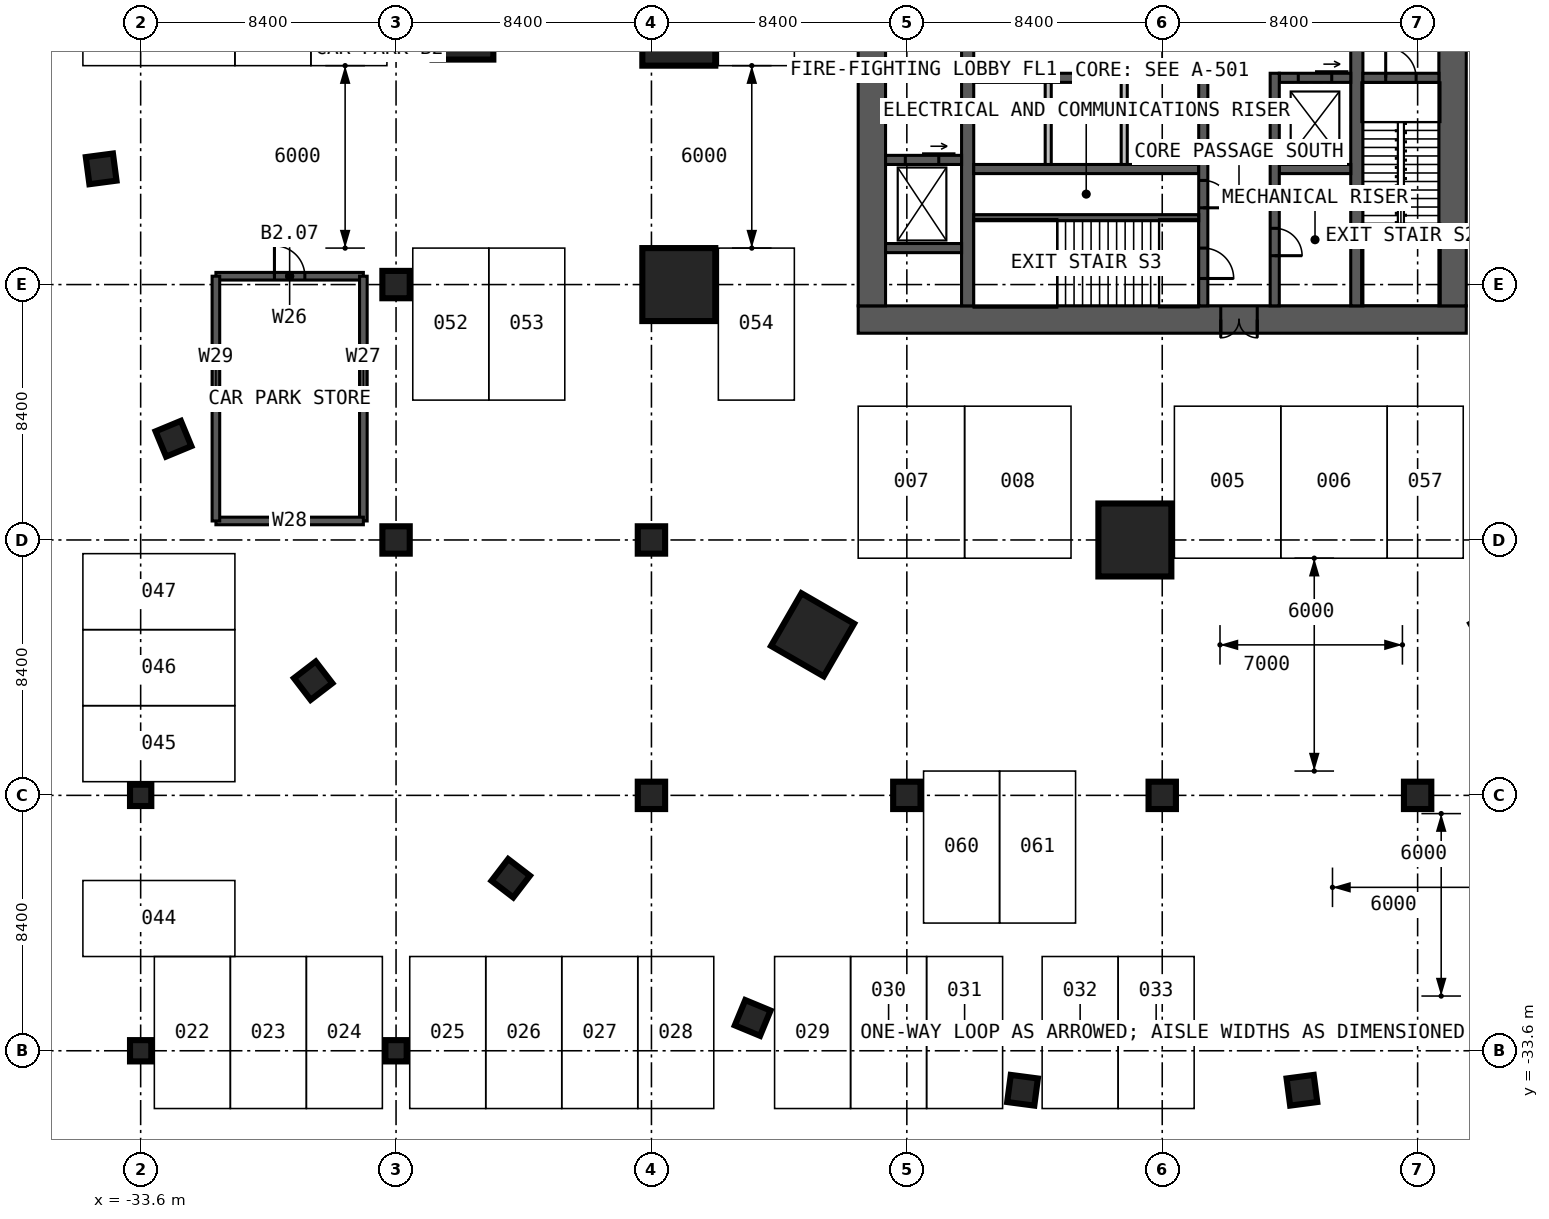
"""IFC4 building model, lengths in metres.
Left out: names, types, materials, properties, quantities, classifications, styles, units other than length and angle.
Written with IfcOpenShell. Run it as: python <this file> out.ifc"""

import sys

from ifc_helpers import new_model, si_unit, direction, frame, frame_2d, origin, origin_2d, place, context, subcontext, project, spatial, rectangle, hollow_rectangle, extrude, element, fill, save


model = new_model("IFC4")
c1 = context("Model", 3, precision=1e-05, world=origin(), true_north=direction((0.0, 1.0)))
c2 = subcontext(c1, "Body", "Model", "MODEL_VIEW")
j1 = project(units=[si_unit("LENGTHUNIT", "METRE"), si_unit("PLANEANGLEUNIT", "RADIAN")], contexts=[c1])
p1 = place(None, origin())
s1 = spatial("IfcSite", under=j1, at=p1, CompositionType="ELEMENT")
p2 = place(p1, origin())
s2 = spatial("IfcBuilding", under=s1, at=p2, CompositionType="ELEMENT")
p3 = place(p2, frame((0.0, 0.0, -9.0)))
s3 = spatial("IfcBuildingStorey", under=s2, at=p3, CompositionType="ELEMENT", Elevation=-9.0)
for number, where, z_axis, x_axis in (
    (1, (-25.2, -16.8, 0.0), (0.0, 0.0, 1.0), (1.0, 0.0, 0.0)),
    (2, (-25.2, -8.4, 0.0), (0.0, 0.0, 1.0), (1.0, 0.0, 0.0)),
    (3, (-16.8, -25.2, 0.0), (0.0, 0.0, 1.0), (1.0, 0.0, 0.0)),
    (4, (-16.8, -16.8, 0.0), (0.0, 0.0, 1.0), (1.0, 0.0, 0.0)),
):
    element("IfcColumn", number, at=place(p3, frame(where, z_axis=z_axis, x_axis=x_axis)), inside=s3, PredefinedType="COLUMN", context=c2, shape_type="SweptSolid", body=[
        extrude(rectangle(XDim=0.9, YDim=0.9, at=origin_2d()), origin(), (0.0, 0.0, 1.0), 4.5),
    ])
for number, where, z_axis, x_axis in (
    (5, (-15.9, -8.4, 0.0), (0.0, 0.0, 1.0), (1.0, 0.0, 0.0)),
    (6, (-15.9, 0.0, 0.0), (0.0, 0.0, 1.0), (1.0, 0.0, 0.0)),
):
    element("IfcColumn", number, at=place(p3, frame(where, z_axis=z_axis, x_axis=x_axis)), inside=s3, PredefinedType="COLUMN", context=c2, shape_type="SweptSolid", body=[
        extrude(rectangle(XDim=2.4, YDim=2.4, at=origin_2d()), origin(), (0.0, 0.0, 1.0), 4.5),
    ])
for number, where, z_axis, x_axis in (
    (7, (-8.4, -25.2, 0.0), (0.0, 0.0, 1.0), (1.0, 0.0, 0.0)),
    (8, (0.0, -25.2, 0.0), (0.0, 0.0, 1.0), (1.0, 0.0, 0.0)),
):
    element("IfcColumn", number, at=place(p3, frame(where, z_axis=z_axis, x_axis=x_axis)), inside=s3, PredefinedType="COLUMN", context=c2, shape_type="SweptSolid", body=[
        extrude(rectangle(XDim=0.9, YDim=0.9, at=origin_2d()), origin(), (0.0, 0.0, 1.0), 4.5),
    ])
p4 = place(p3, frame((-0.9, -16.8, 0.0), z_axis=(0.0, 0.0, 1.0), x_axis=(1.0, 0.0, 0.0)))
e9 = element("IfcColumn", 9, at=p4, inside=s3, PredefinedType="COLUMN", context=c2, shape_type="SweptSolid", body=[
    extrude(rectangle(XDim=2.4, YDim=2.4, at=origin_2d()), origin(), (0.0, 0.0, 1.0), 4.5),
])
p5 = place(p3, frame((8.4, -25.2, 0.0), z_axis=(0.0, 0.0, 1.0), x_axis=(1.0, 0.0, 0.0)))
e10 = element("IfcColumn", 10, at=p5, inside=s3, PredefinedType="COLUMN", context=c2, shape_type="SweptSolid", body=[
    extrude(rectangle(XDim=0.9, YDim=0.9, at=origin_2d()), origin(), (0.0, 0.0, 1.0), 4.5),
])
for number, where, z_axis, x_axis in (
    (11, (-33.6, -33.6, 0.0), (0.0, 0.0, 1.0), (1.0, 0.0, 0.0)),
    (12, (-33.6, -25.2, 0.0), (0.0, 0.0, 1.0), (1.0, 0.0, 0.0)),
    (13, (-25.2, -33.6, 0.0), (0.0, 0.0, 1.0), (1.0, 0.0, 0.0)),
):
    element("IfcColumn", number, at=place(p3, frame(where, z_axis=z_axis, x_axis=x_axis)), inside=s3, PredefinedType="COLUMN", context=c2, shape_type="SweptSolid", body=[
        extrude(rectangle(XDim=0.7, YDim=0.7, at=origin_2d()), origin(), (0.0, 0.0, 1.0), 4.5),
    ])
for number, where, z_axis, x_axis in (
    (14, (-34.899, -4.594, 0.0), (0.0, 0.0, 1.0), (-0.991, -0.131, 0.0)),
    (15, (-32.521, -13.47, 0.0), (0.0, 0.0, 1.0), (-0.924, -0.383, 0.0)),
    (16, (-27.926, -21.428, 0.0), (0.0, 0.0, 1.0), (-0.793, -0.609, 0.0)),
    (17, (-21.428, -27.926, 0.0), (0.0, 0.0, 1.0), (-0.609, -0.793, 0.0)),
    (18, (-13.47, -32.521, 0.0), (0.0, 0.0, 1.0), (-0.383, -0.924, 0.0)),
    (19, (-4.594, -34.899, 0.0), (0.0, 0.0, 1.0), (-0.131, -0.991, 0.0)),
    (20, (4.594, -34.899, 0.0), (0.0, 0.0, 1.0), (0.131, -0.991, 0.0)),
):
    element("IfcColumn", number, at=place(p3, frame(where, z_axis=z_axis, x_axis=x_axis)), inside=s3, PredefinedType="COLUMN", context=c2, shape_type="SweptSolid", body=[
        extrude(rectangle(XDim=0.9, YDim=0.9, at=origin_2d()), origin(), (0.0, 0.0, 1.0), 4.5),
    ])
for number, where, z_axis, x_axis in (
    (21, (-23.0, 0.0, 0.0), (0.0, 0.0, 1.0), (-1.0, 0.0, 0.0)),
    (22, (-11.5, -19.919, 0.0), (0.0, 0.0, 1.0), (-0.5, -0.866, 0.0)),
):
    element("IfcColumn", number, at=place(p3, frame(where, z_axis=z_axis, x_axis=x_axis)), inside=s3, PredefinedType="COLUMN", context=c2, shape_type="SweptSolid", body=[
        extrude(hollow_rectangle(XDim=2.0, YDim=2.0, WallThickness=0.24, at=origin_2d()), origin(), (0.0, 0.0, 1.0), 4.5),
    ])
p6 = place(p3, frame((10.0, -9.55, 0.0), z_axis=(0.0, 0.0, 1.0), x_axis=(-1.0, 0.0, 0.0)))
e23 = element("IfcWall", 23, at=p6, inside=s3, PredefinedType="SOLIDWALL", context=c2, shape_type="SweptSolid", body=[
    extrude(rectangle(XDim=20.0, YDim=0.9, at=frame_2d((10.0, 0.0))), origin(), (0.0, 0.0, 1.0), 4.5),
])
p7 = place(p6, frame((6.875, 0.0, 0.0)))
e24 = element("IfcOpeningElement", 24, at=p7, cuts=e23, PredefinedType="OPENING", context=c2, shape_type="SweptSolid", body=[
    extrude(rectangle(XDim=1.2, YDim=2.2, at=frame_2d((0.6, 1.1))), frame((0.0, 0.46, 0.0), z_axis=(0.0, -1.0, 0.0), x_axis=(1.0, 0.0, 0.0)), (0.0, 0.0, 1.0), 0.92),
])
for number, where, z_axis, x_axis in (
    (25, (9.55, -9.1, 0.0), (0.0, 0.0, 1.0), (0.0, 1.0, 0.0)),
    (26, (-9.55, 9.1, 0.0), (0.0, 0.0, 1.0), (0.0, -1.0, 0.0)),
):
    element("IfcWall", number, at=place(p3, frame(where, z_axis=z_axis, x_axis=x_axis)), inside=s3, PredefinedType="SOLIDWALL", context=c2, shape_type="SweptSolid", body=[
        extrude(rectangle(XDim=18.2, YDim=0.9, at=frame_2d((9.1, 0.0))), origin(), (0.0, 0.0, 1.0), 4.5),
    ])
p8 = place(p3, frame((-6.4, -9.1, 0.0), z_axis=(0.0, 0.0, 1.0), x_axis=(0.0, 1.0, 0.0)))
e27 = element("IfcWall", 27, at=p8, inside=s3, PredefinedType="SOLIDWALL", context=c2, shape_type="SweptSolid", body=[
    extrude(rectangle(XDim=18.2, YDim=0.4, at=frame_2d((9.1, 0.0))), origin(), (0.0, 0.0, 1.0), 4.5),
])
p9 = place(p8, frame((8.6, 0.0, 0.0)))
e28 = element("IfcOpeningElement", 28, at=p9, cuts=e27, PredefinedType="OPENING", context=c2, shape_type="SweptSolid", body=[
    extrude(rectangle(XDim=1.0, YDim=2.2, at=frame_2d((0.5, 1.1))), frame((0.0, 0.21, 0.0), z_axis=(0.0, -1.0, 0.0), x_axis=(1.0, 0.0, 0.0)), (0.0, 0.0, 1.0), 0.42),
])
p10 = place(p3, frame((6.4, 9.1, 0.0), z_axis=(0.0, 0.0, 1.0), x_axis=(0.0, -1.0, 0.0)))
e29 = element("IfcWall", 29, at=p10, inside=s3, PredefinedType="SOLIDWALL", context=c2, shape_type="SweptSolid", body=[
    extrude(rectangle(XDim=18.2, YDim=0.4, at=frame_2d((9.1, 0.0))), origin(), (0.0, 0.0, 1.0), 4.5),
])
p11 = place(p10, frame((8.6, 0.0, 0.0)))
e30 = element("IfcOpeningElement", 30, at=p11, cuts=e29, PredefinedType="OPENING", context=c2, shape_type="SweptSolid", body=[
    extrude(rectangle(XDim=1.0, YDim=2.2, at=frame_2d((0.5, 1.1))), frame((0.0, 0.21, 0.0), z_axis=(0.0, -1.0, 0.0), x_axis=(1.0, 0.0, 0.0)), (0.0, 0.0, 1.0), 0.42),
])
p12 = place(p3, frame((-6.2, -1.6, 0.0), z_axis=(0.0, 0.0, 1.0), x_axis=(1.0, 0.0, 0.0)))
e31 = element("IfcWall", 31, at=p12, inside=s3, PredefinedType="SOLIDWALL", context=c2, shape_type="SweptSolid", body=[
    extrude(rectangle(XDim=7.4, YDim=0.3, at=frame_2d((3.7, 0.0))), origin(), (0.0, 0.0, 1.0), 4.5),
])
p13 = place(p3, frame((3.85, -1.6, 0.0), z_axis=(0.0, 0.0, 1.0), x_axis=(1.0, 0.0, 0.0)))
e32 = element("IfcWall", 32, at=p13, inside=s3, PredefinedType="SOLIDWALL", context=c2, shape_type="SweptSolid", body=[
    extrude(rectangle(XDim=2.35, YDim=0.3, at=frame_2d((1.175, 0.0))), origin(), (0.0, 0.0, 1.0), 4.5),
])
p14 = place(p13, frame((0.625, 0.0, 0.0)))
e33 = element("IfcOpeningElement", 33, at=p14, cuts=e32, PredefinedType="OPENING", context=c2, shape_type="SweptSolid", body=[
    extrude(rectangle(XDim=1.1, YDim=2.2, at=frame_2d((0.55, 1.1))), frame((0.0, 0.16, 0.0), z_axis=(0.0, -1.0, 0.0), x_axis=(1.0, 0.0, 0.0)), (0.0, 0.0, 1.0), 0.32),
])
p15 = place(p3, frame((-6.2, -4.6, 0.0), z_axis=(0.0, 0.0, 1.0), x_axis=(1.0, 0.0, 0.0)))
e34 = element("IfcWall", 34, at=p15, inside=s3, PredefinedType="SOLIDWALL", context=c2, shape_type="SweptSolid", body=[
    extrude(rectangle(XDim=7.4, YDim=0.3, at=frame_2d((3.7, 0.0))), origin(), (0.0, 0.0, 1.0), 4.5),
])
p16 = place(p3, frame((3.85, -4.6, 0.0), z_axis=(0.0, 0.0, 1.0), x_axis=(1.0, 0.0, 0.0)))
e35 = element("IfcWall", 35, at=p16, inside=s3, PredefinedType="SOLIDWALL", context=c2, shape_type="SweptSolid", body=[
    extrude(rectangle(XDim=2.35, YDim=0.3, at=frame_2d((1.175, 0.0))), origin(), (0.0, 0.0, 1.0), 4.5),
])
p17 = place(p3, frame((1.35, -1.45, 0.0), z_axis=(0.0, 0.0, 1.0), x_axis=(0.0, -1.0, 0.0)))
e36 = element("IfcWall", 36, at=p17, inside=s3, PredefinedType="SOLIDWALL", context=c2, shape_type="SweptSolid", body=[
    extrude(rectangle(XDim=7.65, YDim=0.3, at=frame_2d((3.825, 0.0))), origin(), (0.0, 0.0, 1.0), 4.5),
])
p18 = place(p17, frame((5.75, 0.0, 0.0)))
e37 = element("IfcOpeningElement", 37, at=p18, cuts=e36, PredefinedType="OPENING", context=c2, shape_type="SweptSolid", body=[
    extrude(rectangle(XDim=1.0, YDim=2.2, at=frame_2d((0.5, 1.1))), frame((0.0, 0.16, 0.0), z_axis=(0.0, -1.0, 0.0), x_axis=(1.0, 0.0, 0.0)), (0.0, 0.0, 1.0), 0.32),
])
p19 = place(p17, frame((3.525, 0.0, 0.0)))
e38 = element("IfcOpeningElement", 38, at=p19, cuts=e36, PredefinedType="OPENING", context=c2, shape_type="SweptSolid", body=[
    extrude(rectangle(XDim=0.9, YDim=2.2, at=frame_2d((0.45, 1.1))), frame((0.0, 0.16, 0.0), z_axis=(0.0, -1.0, 0.0), x_axis=(1.0, 0.0, 0.0)), (0.0, 0.0, 1.0), 0.32),
])
p20 = place(p3, frame((3.7, -1.45, 0.0), z_axis=(0.0, 0.0, 1.0), x_axis=(0.0, -1.0, 0.0)))
e39 = element("IfcWall", 39, at=p20, inside=s3, PredefinedType="SOLIDWALL", context=c2, shape_type="SweptSolid", body=[
    extrude(rectangle(XDim=7.65, YDim=0.3, at=frame_2d((3.825, 0.0))), origin(), (0.0, 0.0, 1.0), 4.5),
])
p21 = place(p20, frame((5.1, 0.0, 0.0)))
e40 = element("IfcOpeningElement", 40, at=p21, cuts=e39, PredefinedType="OPENING", context=c2, shape_type="SweptSolid", body=[
    extrude(rectangle(XDim=0.9, YDim=2.2, at=frame_2d((0.45, 1.1))), frame((0.0, 0.16, 0.0), z_axis=(0.0, -1.0, 0.0), x_axis=(1.0, 0.0, 0.0)), (0.0, 0.0, 1.0), 0.32),
])
p22 = place(p3, frame((-6.2, -6.2, 0.0), z_axis=(0.0, 0.0, 1.0), x_axis=(1.0, 0.0, 0.0)))
e41 = element("IfcWall", 41, at=p22, inside=s3, PredefinedType="SOLIDWALL", context=c2, shape_type="SweptSolid", body=[
    extrude(rectangle(XDim=7.4, YDim=0.2, at=frame_2d((3.7, 0.0))), origin(), (0.0, 0.0, 1.0), 4.5),
])
p23 = place(p3, frame((6.6, -1.6, 0.0), z_axis=(0.0, 0.0, 1.0), x_axis=(1.0, 0.0, 0.0)))
e42 = element("IfcWall", 42, at=p23, inside=s3, PredefinedType="SOLIDWALL", context=c2, shape_type="SweptSolid", body=[
    extrude(rectangle(XDim=2.5, YDim=0.3, at=frame_2d((1.25, 0.0))), origin(), (0.0, 0.0, 1.0), 4.5),
])
p24 = place(p23, frame((0.75, 0.0, 0.0)))
e43 = element("IfcOpeningElement", 43, at=p24, cuts=e42, PredefinedType="OPENING", context=c2, shape_type="SweptSolid", body=[
    extrude(rectangle(XDim=1.0, YDim=2.2, at=frame_2d((0.5, 1.1))), frame((0.0, 0.16, 0.0), z_axis=(0.0, -1.0, 0.0), x_axis=(1.0, 0.0, 0.0)), (0.0, 0.0, 1.0), 0.32),
])
p25 = place(p3, frame((-9.1, -4.3, 0.0), z_axis=(0.0, 0.0, 1.0), x_axis=(1.0, 0.0, 0.0)))
e44 = element("IfcWall", 44, at=p25, inside=s3, PredefinedType="SOLIDWALL", context=c2, shape_type="SweptSolid", body=[
    extrude(rectangle(XDim=2.5, YDim=0.3, at=frame_2d((1.25, 0.0))), origin(), (0.0, 0.0, 1.0), 4.5),
])
p26 = place(p25, frame((0.65, 0.0, 0.0)))
e45 = element("IfcOpeningElement", 45, at=p26, cuts=e44, PredefinedType="OPENING", context=c2, shape_type="SweptSolid", body=[
    extrude(rectangle(XDim=1.1, YDim=2.2, at=frame_2d((0.55, 1.1))), frame((0.0, 0.16, 0.0), z_axis=(0.0, -1.0, 0.0), x_axis=(1.0, 0.0, 0.0)), (0.0, 0.0, 1.0), 0.32),
])
p27 = place(p3, frame((-9.1, -7.2, 0.0), z_axis=(0.0, 0.0, 1.0), x_axis=(1.0, 0.0, 0.0)))
e46 = element("IfcWall", 46, at=p27, inside=s3, PredefinedType="SOLIDWALL", context=c2, shape_type="SweptSolid", body=[
    extrude(rectangle(XDim=2.5, YDim=0.3, at=frame_2d((1.25, 0.0))), origin(), (0.0, 0.0, 1.0), 4.5),
])
for number, where, z_axis, x_axis in (
    (47, (-3.75, -1.75, 0.0), (0.0, 0.0, 1.0), (0.0, -1.0, 0.0)),
    (48, (-1.25, -1.75, 0.0), (0.0, 0.0, 1.0), (0.0, -1.0, 0.0)),
):
    element("IfcWall", number, at=place(p3, frame(where, z_axis=z_axis, x_axis=x_axis)), inside=s3, PredefinedType="SOLIDWALL", context=c2, shape_type="SweptSolid", body=[
        extrude(rectangle(XDim=2.7, YDim=0.2, at=frame_2d((1.35, 0.0))), origin(), (0.0, 0.0, 1.0), 4.25),
    ])
p28 = place(p3, frame((-31.125, -8.125, 0.0), z_axis=(0.0, 0.0, 1.0), x_axis=(1.0, 0.0, 0.0)))
e49 = element("IfcWall", 49, at=p28, inside=s3, PredefinedType="SOLIDWALL", context=c2, shape_type="SweptSolid", body=[
    extrude(rectangle(XDim=4.85, YDim=0.25, at=frame_2d((2.425, 0.0))), origin(), (0.0, 0.0, 1.0), 4.5),
])
p29 = place(p28, frame((1.925, 0.0, 0.0)))
e50 = element("IfcOpeningElement", 50, at=p29, cuts=e49, PredefinedType="OPENING", context=c2, shape_type="SweptSolid", body=[
    extrude(rectangle(XDim=1.0, YDim=2.2, at=frame_2d((0.5, 1.1))), frame((0.0, 0.135, 0.0), z_axis=(0.0, -1.0, 0.0), x_axis=(1.0, 0.0, 0.0)), (0.0, 0.0, 1.0), 0.27),
])
p30 = place(p3, frame((-26.275, -8.125, 0.0), z_axis=(0.0, 0.0, 1.0), x_axis=(0.0, -1.0, 0.0)))
e51 = element("IfcWall", 51, at=p30, inside=s3, PredefinedType="SOLIDWALL", context=c2, shape_type="SweptSolid", body=[
    extrude(rectangle(XDim=8.05, YDim=0.25, at=frame_2d((4.025, 0.0))), origin(), (0.0, 0.0, 1.0), 4.5),
])
p31 = place(p3, frame((-26.275, -16.175, 0.0), z_axis=(0.0, 0.0, 1.0), x_axis=(-1.0, 0.0, 0.0)))
e52 = element("IfcWall", 52, at=p31, inside=s3, PredefinedType="SOLIDWALL", context=c2, shape_type="SweptSolid", body=[
    extrude(rectangle(XDim=4.85, YDim=0.25, at=frame_2d((2.425, 0.0))), origin(), (0.0, 0.0, 1.0), 4.5),
])
p32 = place(p3, frame((-31.125, -16.175, 0.0), z_axis=(0.0, 0.0, 1.0), x_axis=(0.0, 1.0, 0.0)))
e53 = element("IfcWall", 53, at=p32, inside=s3, PredefinedType="SOLIDWALL", context=c2, shape_type="SweptSolid", body=[
    extrude(rectangle(XDim=8.05, YDim=0.25, at=frame_2d((4.025, 0.0))), origin(), (0.0, 0.0, 1.0), 4.5),
])
p33 = place(p7, origin())
e54 = element("IfcDoor", 54, at=p33, inside=s3, OperationType="DOUBLE_DOOR_SINGLE_SWING", PredefinedType="DOOR", context=c2, shape_type="SweptSolid", body=[
    extrude(rectangle(XDim=1.2, YDim=2.2, at=frame_2d((0.6, 1.1))), frame((0.0, 0.025, 0.0), z_axis=(0.0, -1.0, 0.0), x_axis=(1.0, 0.0, 0.0)), (0.0, 0.0, 1.0), 0.05),
])
fill(e24, e54)
p34 = place(p24, origin())
e55 = element("IfcDoor", 55, at=p34, inside=s3, OperationType="SINGLE_SWING_LEFT", PredefinedType="DOOR", context=c2, shape_type="SweptSolid", body=[
    extrude(rectangle(XDim=1.0, YDim=2.2, at=frame_2d((0.5, 1.1))), frame((0.0, 0.025, 0.0), z_axis=(0.0, -1.0, 0.0), x_axis=(1.0, 0.0, 0.0)), (0.0, 0.0, 1.0), 0.05),
])
fill(e43, e55)
p35 = place(p18, origin())
e56 = element("IfcDoor", 56, at=p35, inside=s3, OperationType="SINGLE_SWING_RIGHT", PredefinedType="DOOR", context=c2, shape_type="SweptSolid", body=[
    extrude(rectangle(XDim=1.0, YDim=2.2, at=frame_2d((0.5, 1.1))), frame((0.0, 0.025, 0.0), z_axis=(0.0, -1.0, 0.0), x_axis=(1.0, 0.0, 0.0)), (0.0, 0.0, 1.0), 0.05),
])
fill(e37, e56)
p36 = place(p19, origin())
e57 = element("IfcDoor", 57, at=p36, inside=s3, OperationType="SINGLE_SWING_RIGHT", PredefinedType="DOOR", context=c2, shape_type="SweptSolid", body=[
    extrude(rectangle(XDim=0.9, YDim=2.2, at=frame_2d((0.45, 1.1))), frame((0.0, 0.025, 0.0), z_axis=(0.0, -1.0, 0.0), x_axis=(1.0, 0.0, 0.0)), (0.0, 0.0, 1.0), 0.05),
])
fill(e38, e57)
p37 = place(p21, origin())
e58 = element("IfcDoor", 58, at=p37, inside=s3, OperationType="SINGLE_SWING_RIGHT", PredefinedType="DOOR", context=c2, shape_type="SweptSolid", body=[
    extrude(rectangle(XDim=0.9, YDim=2.2, at=frame_2d((0.45, 1.1))), frame((0.0, 0.025, 0.0), z_axis=(0.0, -1.0, 0.0), x_axis=(1.0, 0.0, 0.0)), (0.0, 0.0, 1.0), 0.05),
])
fill(e40, e58)
p38 = place(p14, origin())
e59 = element("IfcDoor", 59, at=p38, inside=s3, OperationType="SLIDING_TO_LEFT", PredefinedType="DOOR", context=c2, shape_type="SweptSolid", body=[
    extrude(rectangle(XDim=1.1, YDim=2.2, at=frame_2d((0.55, 1.1))), frame((0.0, 0.025, 0.0), z_axis=(0.0, -1.0, 0.0), x_axis=(1.0, 0.0, 0.0)), (0.0, 0.0, 1.0), 0.05),
])
fill(e33, e59)
p39 = place(p26, origin())
e60 = element("IfcDoor", 60, at=p39, inside=s3, OperationType="SLIDING_TO_LEFT", PredefinedType="DOOR", context=c2, shape_type="SweptSolid", body=[
    extrude(rectangle(XDim=1.1, YDim=2.2, at=frame_2d((0.55, 1.1))), frame((0.0, 0.025, 0.0), z_axis=(0.0, -1.0, 0.0), x_axis=(1.0, 0.0, 0.0)), (0.0, 0.0, 1.0), 0.05),
])
fill(e45, e60)
p40 = place(p29, origin())
e61 = element("IfcDoor", 61, at=p40, inside=s3, OperationType="SINGLE_SWING_LEFT", PredefinedType="DOOR", context=c2, shape_type="SweptSolid", body=[
    extrude(rectangle(XDim=1.0, YDim=2.2, at=frame_2d((0.5, 1.1))), frame((0.0, 0.025, 0.0), z_axis=(0.0, -1.0, 0.0), x_axis=(1.0, 0.0, 0.0)), (0.0, 0.0, 1.0), 0.05),
])
fill(e50, e61)
save(model, sys.argv[1])
